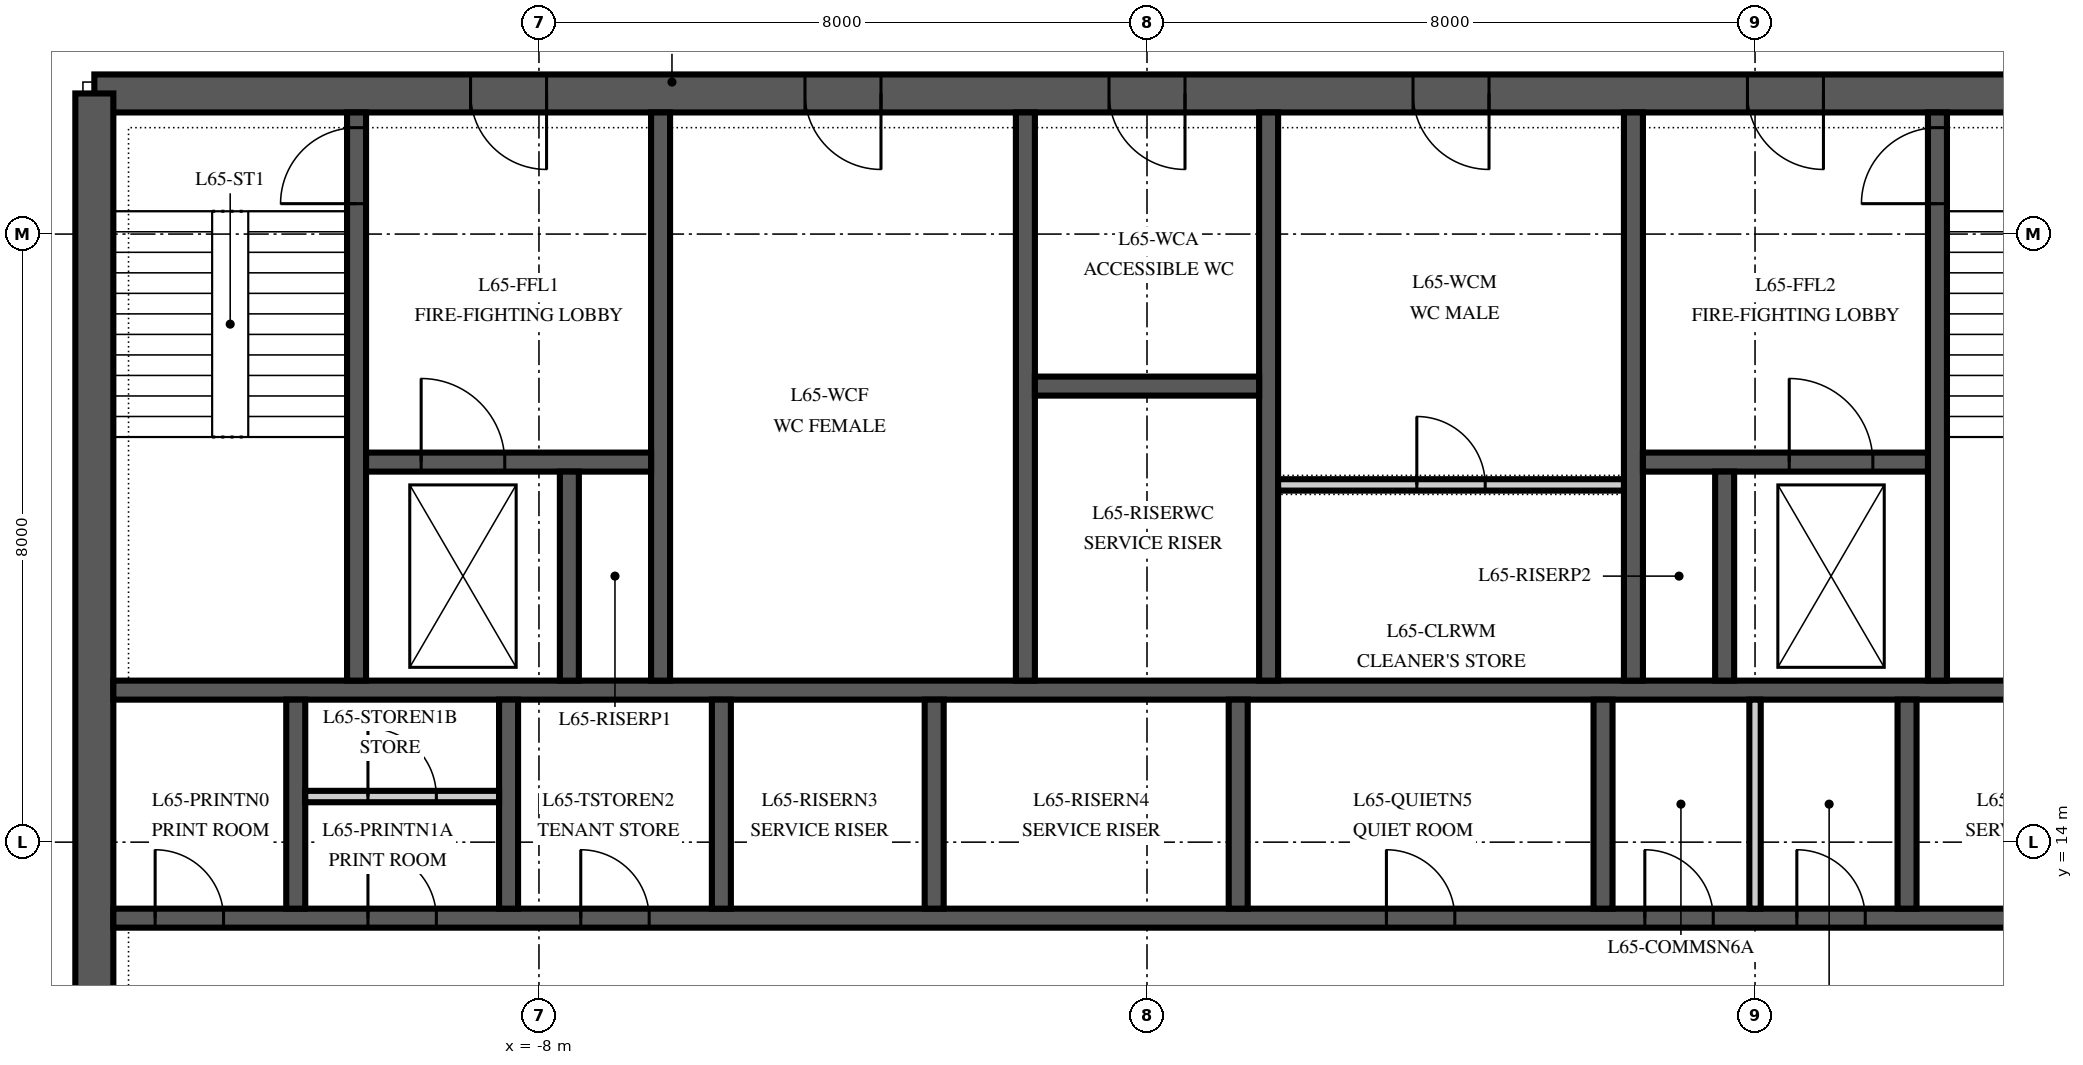
"""IFC4 building model, lengths in metres.
Left out: names, types, materials, properties, quantities, classifications, styles, units other than length and angle.
Written with IfcOpenShell. Run it as: python <this file> out.ifc"""

import sys

from ifc_helpers import new_model, si_unit, direction, frame, frame_2d, origin, place, context, subcontext, project, spatial, polyline, rectangle, outline, extrude, element, fill, save


model = new_model("IFC4")
c1 = context("Model", 3, precision=1e-05, world=origin(), true_north=direction((0.0, 1.0)))
c2 = subcontext(c1, "Body", "Model", "MODEL_VIEW")
j1 = project(units=[si_unit("LENGTHUNIT", "METRE"), si_unit("PLANEANGLEUNIT", "RADIAN")], contexts=[c1])
p1 = place(None, origin())
s1 = spatial("IfcSite", under=j1, at=p1, CompositionType="ELEMENT")
p2 = place(p1, origin())
s2 = spatial("IfcBuilding", under=s1, at=p2, CompositionType="ELEMENT")
p3 = place(p2, frame((0.0, 0.0, 280.0)))
s3 = spatial("IfcBuildingStorey", under=s2, at=p3, CompositionType="ELEMENT", Elevation=280.0)
p4 = place(p3, frame((13.85, 23.85, 0.0), z_axis=(0.0, 0.0, 1.0), x_axis=(-1.0, 0.0, 0.0)))
e1 = element("IfcWall", 1, at=p4, inside=s3, PredefinedType="SHEAR", context=c2, shape_type="SweptSolid", body=[
    extrude(rectangle(XDim=27.7, YDim=0.5, at=frame_2d((13.85, 0.0))), origin(), (0.0, 0.0, 1.0), 4.0),
])
p5 = place(p4, frame((21.75, 0.0, 0.0)))
e2 = element("IfcOpeningElement", 2, at=p5, cuts=e1, PredefinedType="OPENING", context=c2, shape_type="SweptSolid", body=[
    extrude(rectangle(XDim=1.0, YDim=2.1, at=frame_2d((0.5, 1.05))), frame((0.0, 0.265, 0.0), z_axis=(0.0, -1.0, 0.0), x_axis=(1.0, 0.0, 0.0)), (0.0, 0.0, 1.0), 0.53),
])
p6 = place(p4, frame((4.95, 0.0, 0.0)))
e3 = element("IfcOpeningElement", 3, at=p6, cuts=e1, PredefinedType="OPENING", context=c2, shape_type="SweptSolid", body=[
    extrude(rectangle(XDim=1.0, YDim=2.1, at=frame_2d((0.5, 1.05))), frame((0.0, 0.265, 0.0), z_axis=(0.0, -1.0, 0.0), x_axis=(1.0, 0.0, 0.0)), (0.0, 0.0, 1.0), 0.53),
])
p7 = place(p4, frame((17.35, 0.0, 0.0)))
e4 = element("IfcOpeningElement", 4, at=p7, cuts=e1, PredefinedType="OPENING", context=c2, shape_type="SweptSolid", body=[
    extrude(rectangle(XDim=1.0, YDim=2.1, at=frame_2d((0.5, 1.05))), frame((0.0, 0.265, 0.0), z_axis=(0.0, -1.0, 0.0), x_axis=(1.0, 0.0, 0.0)), (0.0, 0.0, 1.0), 0.53),
])
p8 = place(p4, frame((13.35, 0.0, 0.0)))
e5 = element("IfcOpeningElement", 5, at=p8, cuts=e1, PredefinedType="OPENING", context=c2, shape_type="SweptSolid", body=[
    extrude(rectangle(XDim=1.0, YDim=2.1, at=frame_2d((0.5, 1.05))), frame((0.0, 0.265, 0.0), z_axis=(0.0, -1.0, 0.0), x_axis=(1.0, 0.0, 0.0)), (0.0, 0.0, 1.0), 0.53),
])
p9 = place(p4, frame((9.35, 0.0, 0.0)))
e6 = element("IfcOpeningElement", 6, at=p9, cuts=e1, PredefinedType="OPENING", context=c2, shape_type="SweptSolid", body=[
    extrude(rectangle(XDim=1.0, YDim=2.1, at=frame_2d((0.5, 1.05))), frame((0.0, 0.265, 0.0), z_axis=(0.0, -1.0, 0.0), x_axis=(1.0, 0.0, 0.0)), (0.0, 0.0, 1.0), 0.53),
])
p10 = place(p3, frame((-13.85, 23.85, 0.0), z_axis=(0.0, 0.0, 1.0), x_axis=(0.0, -1.0, 0.0)))
e7 = element("IfcWall", 7, at=p10, inside=s3, PredefinedType="SHEAR", context=c2, shape_type="SweptSolid", body=[
    extrude(outline(polyline([(0.0, -0.25), (17.7, -0.25), (17.7, 0.0), (17.45, 0.0), (17.45, 0.25), (0.25, 0.25), (0.25, 0.0), (0.0, 0.0), (0.0, -0.25)])), origin(), (0.0, 0.0, 1.0), 4.0),
])
p11 = place(p10, frame((11.75, 0.0, 0.0)))
e8 = element("IfcOpeningElement", 8, at=p11, cuts=e7, PredefinedType="OPENING", context=c2, shape_type="SweptSolid", body=[
    extrude(rectangle(XDim=1.8, YDim=2.4, at=frame_2d((0.9, 1.2))), frame((0.0, 0.265, 0.0), z_axis=(0.0, -1.0, 0.0), x_axis=(1.0, 0.0, 0.0)), (0.0, 0.0, 1.0), 0.53),
])
p12 = place(p3, frame((-13.6, 13.0, 0.0), z_axis=(0.0, 0.0, 1.0), x_axis=(1.0, 0.0, 0.0)))
e9 = element("IfcWall", 9, at=p12, inside=s3, PredefinedType="SHEAR", context=c2, shape_type="SweptSolid", body=[
    extrude(rectangle(XDim=27.2, YDim=0.25, at=frame_2d((13.6, 0.0))), origin(), (0.0, 0.0, 1.0), 4.0),
])
p13 = place(p12, frame((16.75, 0.0, 0.0)))
e10 = element("IfcOpeningElement", 10, at=p13, cuts=e9, PredefinedType="OPENING", context=c2, shape_type="SweptSolid", body=[
    extrude(rectangle(XDim=0.9, YDim=2.1, at=frame_2d((0.45, 1.05))), frame((0.0, 0.14, 0.0), z_axis=(0.0, -1.0, 0.0), x_axis=(1.0, 0.0, 0.0)), (0.0, 0.0, 1.0), 0.28),
])
p14 = place(p12, frame((20.15, 0.0, 0.0)))
e11 = element("IfcOpeningElement", 11, at=p14, cuts=e9, PredefinedType="OPENING", context=c2, shape_type="SweptSolid", body=[
    extrude(rectangle(XDim=0.9, YDim=2.1, at=frame_2d((0.45, 1.05))), frame((0.0, 0.14, 0.0), z_axis=(0.0, -1.0, 0.0), x_axis=(1.0, 0.0, 0.0)), (0.0, 0.0, 1.0), 0.28),
])
p15 = place(p12, frame((22.15, 0.0, 0.0)))
e12 = element("IfcOpeningElement", 12, at=p15, cuts=e9, PredefinedType="OPENING", context=c2, shape_type="SweptSolid", body=[
    extrude(rectangle(XDim=0.9, YDim=2.1, at=frame_2d((0.45, 1.05))), frame((0.0, 0.14, 0.0), z_axis=(0.0, -1.0, 0.0), x_axis=(1.0, 0.0, 0.0)), (0.0, 0.0, 1.0), 0.28),
])
p16 = place(p12, frame((0.55, 0.0, 0.0)))
e13 = element("IfcOpeningElement", 13, at=p16, cuts=e9, PredefinedType="OPENING", context=c2, shape_type="SweptSolid", body=[
    extrude(rectangle(XDim=0.9, YDim=2.1, at=frame_2d((0.45, 1.05))), frame((0.0, 0.14, 0.0), z_axis=(0.0, -1.0, 0.0), x_axis=(1.0, 0.0, 0.0)), (0.0, 0.0, 1.0), 0.28),
])
p17 = place(p12, frame((3.35, 0.0, 0.0)))
e14 = element("IfcOpeningElement", 14, at=p17, cuts=e9, PredefinedType="OPENING", context=c2, shape_type="SweptSolid", body=[
    extrude(rectangle(XDim=0.9, YDim=2.1, at=frame_2d((0.45, 1.05))), frame((0.0, 0.14, 0.0), z_axis=(0.0, -1.0, 0.0), x_axis=(1.0, 0.0, 0.0)), (0.0, 0.0, 1.0), 0.28),
])
p18 = place(p12, frame((6.15, 0.0, 0.0)))
e15 = element("IfcOpeningElement", 15, at=p18, cuts=e9, PredefinedType="OPENING", context=c2, shape_type="SweptSolid", body=[
    extrude(rectangle(XDim=0.9, YDim=2.1, at=frame_2d((0.45, 1.05))), frame((0.0, 0.14, 0.0), z_axis=(0.0, -1.0, 0.0), x_axis=(1.0, 0.0, 0.0)), (0.0, 0.0, 1.0), 0.28),
])
p19 = place(p3, frame((-13.6, 16.0, 0.0), z_axis=(0.0, 0.0, 1.0), x_axis=(1.0, 0.0, 0.0)))
e16 = element("IfcWall", 16, at=p19, inside=s3, PredefinedType="SHEAR", context=c2, shape_type="SweptSolid", body=[
    extrude(rectangle(XDim=27.2, YDim=0.25, at=frame_2d((13.6, 0.0))), origin(), (0.0, 0.0, 1.0), 4.0),
])
for number, where, z_axis, x_axis in (
    (17, (-11.2, 13.125, 0.0), (0.0, 0.0, 1.0), (0.0, 1.0, 0.0)),
    (18, (-8.4, 13.125, 0.0), (0.0, 0.0, 1.0), (0.0, 1.0, 0.0)),
    (19, (-5.6, 13.125, 0.0), (0.0, 0.0, 1.0), (0.0, 1.0, 0.0)),
    (20, (-2.8, 13.125, 0.0), (0.0, 0.0, 1.0), (0.0, 1.0, 0.0)),
    (21, (1.2, 13.125, 0.0), (0.0, 0.0, 1.0), (0.0, 1.0, 0.0)),
    (22, (6.0, 13.125, 0.0), (0.0, 0.0, 1.0), (0.0, 1.0, 0.0)),
    (23, (10.0, 13.125, 0.0), (0.0, 0.0, 1.0), (0.0, 1.0, 0.0)),
):
    element("IfcWall", number, at=place(p3, frame(where, z_axis=z_axis, x_axis=x_axis)), inside=s3, PredefinedType="SHEAR", context=c2, shape_type="SweptSolid", body=[
        extrude(rectangle(XDim=2.75, YDim=0.25, at=frame_2d((1.375, 0.0))), origin(), (0.0, 0.0, 1.0), 4.0),
    ])
p20 = place(p3, frame((-10.4, 16.125, 0.0), z_axis=(0.0, 0.0, 1.0), x_axis=(0.0, 1.0, 0.0)))
e24 = element("IfcWall", 24, at=p20, inside=s3, PredefinedType="SHEAR", context=c2, shape_type="SweptSolid", body=[
    extrude(rectangle(XDim=7.475, YDim=0.25, at=frame_2d((3.738, 0.0))), origin(), (0.0, 0.0, 1.0), 4.0),
])
p21 = place(p20, frame((6.275, 0.0, 0.0)))
e25 = element("IfcOpeningElement", 25, at=p21, cuts=e24, PredefinedType="OPENING", context=c2, shape_type="SweptSolid", body=[
    extrude(rectangle(XDim=1.0, YDim=2.1, at=frame_2d((0.5, 1.05))), frame((0.0, 0.14, 0.0), z_axis=(0.0, -1.0, 0.0), x_axis=(1.0, 0.0, 0.0)), (0.0, 0.0, 1.0), 0.28),
])
for number, where, z_axis, x_axis in (
    (26, (-6.4, 16.125, 0.0), (0.0, 0.0, 1.0), (0.0, 1.0, 0.0)),
    (27, (-1.6, 16.125, 0.0), (0.0, 0.0, 1.0), (0.0, 1.0, 0.0)),
    (28, (1.6, 16.125, 0.0), (0.0, 0.0, 1.0), (0.0, 1.0, 0.0)),
    (29, (6.4, 16.125, 0.0), (0.0, 0.0, 1.0), (0.0, 1.0, 0.0)),
):
    element("IfcWall", number, at=place(p3, frame(where, z_axis=z_axis, x_axis=x_axis)), inside=s3, PredefinedType="SHEAR", context=c2, shape_type="SweptSolid", body=[
        extrude(rectangle(XDim=7.475, YDim=0.25, at=frame_2d((3.738, 0.0))), origin(), (0.0, 0.0, 1.0), 4.0),
    ])
p22 = place(p3, frame((10.4, 16.125, 0.0), z_axis=(0.0, 0.0, 1.0), x_axis=(0.0, 1.0, 0.0)))
e30 = element("IfcWall", 30, at=p22, inside=s3, PredefinedType="SHEAR", context=c2, shape_type="SweptSolid", body=[
    extrude(rectangle(XDim=7.475, YDim=0.25, at=frame_2d((3.738, 0.0))), origin(), (0.0, 0.0, 1.0), 4.0),
])
p23 = place(p22, frame((6.275, 0.0, 0.0)))
e31 = element("IfcOpeningElement", 31, at=p23, cuts=e30, PredefinedType="OPENING", context=c2, shape_type="SweptSolid", body=[
    extrude(rectangle(XDim=1.0, YDim=2.1, at=frame_2d((0.5, 1.05))), frame((0.0, 0.14, 0.0), z_axis=(0.0, -1.0, 0.0), x_axis=(1.0, 0.0, 0.0)), (0.0, 0.0, 1.0), 0.28),
])
p24 = place(p3, frame((-10.275, 19.0, 0.0), z_axis=(0.0, 0.0, 1.0), x_axis=(1.0, 0.0, 0.0)))
e32 = element("IfcWall", 32, at=p24, inside=s3, PredefinedType="SHEAR", context=c2, shape_type="SweptSolid", body=[
    extrude(rectangle(XDim=3.75, YDim=0.25, at=frame_2d((1.875, 0.0))), origin(), (0.0, 0.0, 1.0), 4.0),
])
p25 = place(p24, frame((0.725, 0.0, 0.0)))
e33 = element("IfcOpeningElement", 33, at=p25, cuts=e32, PredefinedType="OPENING", context=c2, shape_type="SweptSolid", body=[
    extrude(rectangle(XDim=1.1, YDim=2.1, at=frame_2d((0.55, 1.05))), frame((0.0, 0.14, 0.0), z_axis=(0.0, -1.0, 0.0), x_axis=(1.0, 0.0, 0.0)), (0.0, 0.0, 1.0), 0.28),
])
p26 = place(p3, frame((6.525, 19.0, 0.0), z_axis=(0.0, 0.0, 1.0), x_axis=(1.0, 0.0, 0.0)))
e34 = element("IfcWall", 34, at=p26, inside=s3, PredefinedType="SHEAR", context=c2, shape_type="SweptSolid", body=[
    extrude(rectangle(XDim=3.75, YDim=0.25, at=frame_2d((1.875, 0.0))), origin(), (0.0, 0.0, 1.0), 4.0),
])
p27 = place(p26, frame((1.925, 0.0, 0.0)))
e35 = element("IfcOpeningElement", 35, at=p27, cuts=e34, PredefinedType="OPENING", context=c2, shape_type="SweptSolid", body=[
    extrude(rectangle(XDim=1.1, YDim=2.1, at=frame_2d((0.55, 1.05))), frame((0.0, 0.14, 0.0), z_axis=(0.0, -1.0, 0.0), x_axis=(1.0, 0.0, 0.0)), (0.0, 0.0, 1.0), 0.28),
])
for number, where, z_axis, x_axis in (
    (36, (-7.6, 16.125, 0.0), (0.0, 0.0, 1.0), (0.0, 1.0, 0.0)),
    (37, (7.6, 16.125, 0.0), (0.0, 0.0, 1.0), (0.0, 1.0, 0.0)),
):
    element("IfcWall", number, at=place(p3, frame(where, z_axis=z_axis, x_axis=x_axis)), inside=s3, PredefinedType="SHEAR", context=c2, shape_type="SweptSolid", body=[
        extrude(rectangle(XDim=2.75, YDim=0.25, at=frame_2d((1.375, 0.0))), origin(), (0.0, 0.0, 1.0), 4.0),
    ])
p28 = place(p3, frame((-1.475, 20.0, 0.0), z_axis=(0.0, 0.0, 1.0), x_axis=(1.0, 0.0, 0.0)))
e38 = element("IfcWall", 38, at=p28, inside=s3, PredefinedType="SHEAR", context=c2, shape_type="SweptSolid", body=[
    extrude(rectangle(XDim=2.95, YDim=0.25, at=frame_2d((1.475, 0.0))), origin(), (0.0, 0.0, 1.0), 4.0),
])
p29 = place(p3, frame((1.725, 18.7, 0.0), z_axis=(0.0, 0.0, 1.0), x_axis=(1.0, 0.0, 0.0)))
e39 = element("IfcWall", 39, at=p29, inside=s3, PredefinedType="PARTITIONING", context=c2, shape_type="SweptSolid", body=[
    extrude(rectangle(XDim=4.55, YDim=0.15, at=frame_2d((2.275, 0.0))), origin(), (0.0, 0.0, 1.0), 3.85),
])
p30 = place(p29, frame((1.825, 0.0, 0.0)))
e40 = element("IfcOpeningElement", 40, at=p30, cuts=e39, PredefinedType="OPENING", context=c2, shape_type="SweptSolid", body=[
    extrude(rectangle(XDim=0.9, YDim=2.1, at=frame_2d((0.45, 1.05))), frame((0.0, 0.09, 0.0), z_axis=(0.0, -1.0, 0.0), x_axis=(1.0, 0.0, 0.0)), (0.0, 0.0, 1.0), 0.18),
])
p31 = place(p3, frame((8.0, 13.125, 0.0), z_axis=(0.0, 0.0, 1.0), x_axis=(0.0, 1.0, 0.0)))
e41 = element("IfcWall", 41, at=p31, inside=s3, PredefinedType="PARTITIONING", context=c2, shape_type="SweptSolid", body=[
    extrude(rectangle(XDim=2.75, YDim=0.15, at=frame_2d((1.375, 0.0))), origin(), (0.0, 0.0, 1.0), 3.85),
])
p32 = place(p3, frame((-11.075, 14.6, 0.0), z_axis=(0.0, 0.0, 1.0), x_axis=(1.0, 0.0, 0.0)))
e42 = element("IfcWall", 42, at=p32, inside=s3, PredefinedType="PARTITIONING", context=c2, shape_type="SweptSolid", body=[
    extrude(rectangle(XDim=2.55, YDim=0.15, at=frame_2d((1.275, 0.0))), origin(), (0.0, 0.0, 1.0), 3.85),
])
p33 = place(p32, frame((0.825, 0.0, 0.0)))
e43 = element("IfcOpeningElement", 43, at=p33, cuts=e42, PredefinedType="OPENING", context=c2, shape_type="SweptSolid", body=[
    extrude(rectangle(XDim=0.9, YDim=2.1, at=frame_2d((0.45, 1.05))), frame((0.0, 0.09, 0.0), z_axis=(0.0, -1.0, 0.0), x_axis=(1.0, 0.0, 0.0)), (0.0, 0.0, 1.0), 0.18),
])
p34 = place(p5, origin())
e44 = element("IfcDoor", 44, at=p34, inside=s3, OperationType="SINGLE_SWING_RIGHT", PredefinedType="DOOR", context=c2, shape_type="SweptSolid", body=[
    extrude(rectangle(XDim=1.0, YDim=2.1, at=frame_2d((0.5, 1.05))), frame((0.0, 0.25, 0.0), z_axis=(0.0, -1.0, 0.0), x_axis=(1.0, 0.0, 0.0)), (0.0, 0.0, 1.0), 0.5),
])
fill(e2, e44)
p35 = place(p6, origin())
e45 = element("IfcDoor", 45, at=p35, inside=s3, OperationType="SINGLE_SWING_RIGHT", PredefinedType="DOOR", context=c2, shape_type="SweptSolid", body=[
    extrude(rectangle(XDim=1.0, YDim=2.1, at=frame_2d((0.5, 1.05))), frame((0.0, 0.25, 0.0), z_axis=(0.0, -1.0, 0.0), x_axis=(1.0, 0.0, 0.0)), (0.0, 0.0, 1.0), 0.5),
])
fill(e3, e45)
p36 = place(p7, origin())
e46 = element("IfcDoor", 46, at=p36, inside=s3, OperationType="SINGLE_SWING_LEFT", PredefinedType="DOOR", context=c2, shape_type="SweptSolid", body=[
    extrude(rectangle(XDim=1.0, YDim=2.1, at=frame_2d((0.5, 1.05))), frame((0.0, 0.25, 0.0), z_axis=(0.0, -1.0, 0.0), x_axis=(1.0, 0.0, 0.0)), (0.0, 0.0, 1.0), 0.5),
])
fill(e4, e46)
p37 = place(p8, origin())
e47 = element("IfcDoor", 47, at=p37, inside=s3, OperationType="SINGLE_SWING_LEFT", PredefinedType="DOOR", context=c2, shape_type="SweptSolid", body=[
    extrude(rectangle(XDim=1.0, YDim=2.1, at=frame_2d((0.5, 1.05))), frame((0.0, 0.25, 0.0), z_axis=(0.0, -1.0, 0.0), x_axis=(1.0, 0.0, 0.0)), (0.0, 0.0, 1.0), 0.5),
])
fill(e5, e47)
p38 = place(p9, origin())
e48 = element("IfcDoor", 48, at=p38, inside=s3, OperationType="SINGLE_SWING_LEFT", PredefinedType="DOOR", context=c2, shape_type="SweptSolid", body=[
    extrude(rectangle(XDim=1.0, YDim=2.1, at=frame_2d((0.5, 1.05))), frame((0.0, 0.25, 0.0), z_axis=(0.0, -1.0, 0.0), x_axis=(1.0, 0.0, 0.0)), (0.0, 0.0, 1.0), 0.5),
])
fill(e6, e48)
p39 = place(p21, origin())
e49 = element("IfcDoor", 49, at=p39, inside=s3, OperationType="SINGLE_SWING_LEFT", PredefinedType="DOOR", context=c2, shape_type="SweptSolid", body=[
    extrude(rectangle(XDim=1.0, YDim=2.1, at=frame_2d((0.5, 1.05))), frame((0.0, 0.125, 0.0), z_axis=(0.0, -1.0, 0.0), x_axis=(1.0, 0.0, 0.0)), (0.0, 0.0, 1.0), 0.25),
])
fill(e25, e49)
p40 = place(p23, origin())
e50 = element("IfcDoor", 50, at=p40, inside=s3, OperationType="SINGLE_SWING_LEFT", PredefinedType="DOOR", context=c2, shape_type="SweptSolid", body=[
    extrude(rectangle(XDim=1.0, YDim=2.1, at=frame_2d((0.5, 1.05))), frame((0.0, 0.125, 0.0), z_axis=(0.0, -1.0, 0.0), x_axis=(1.0, 0.0, 0.0)), (0.0, 0.0, 1.0), 0.25),
])
fill(e31, e50)
p41 = place(p27, origin())
e51 = element("IfcDoor", 51, at=p41, inside=s3, OperationType="SLIDING_TO_RIGHT", PredefinedType="DOOR", context=c2, shape_type="SweptSolid", body=[
    extrude(rectangle(XDim=1.1, YDim=2.1, at=frame_2d((0.55, 1.05))), frame((0.0, 0.125, 0.0), z_axis=(0.0, -1.0, 0.0), x_axis=(1.0, 0.0, 0.0)), (0.0, 0.0, 1.0), 0.25),
])
fill(e35, e51)
p42 = place(p25, origin())
e52 = element("IfcDoor", 52, at=p42, inside=s3, OperationType="SLIDING_TO_RIGHT", PredefinedType="DOOR", context=c2, shape_type="SweptSolid", body=[
    extrude(rectangle(XDim=1.1, YDim=2.1, at=frame_2d((0.55, 1.05))), frame((0.0, 0.125, 0.0), z_axis=(0.0, -1.0, 0.0), x_axis=(1.0, 0.0, 0.0)), (0.0, 0.0, 1.0), 0.25),
])
fill(e33, e52)
p43 = place(p13, origin())
e53 = element("IfcDoor", 53, at=p43, inside=s3, OperationType="SINGLE_SWING_LEFT", PredefinedType="DOOR", context=c2, shape_type="SweptSolid", body=[
    extrude(rectangle(XDim=0.9, YDim=2.1, at=frame_2d((0.45, 1.05))), frame((0.0, 0.125, 0.0), z_axis=(0.0, -1.0, 0.0), x_axis=(1.0, 0.0, 0.0)), (0.0, 0.0, 1.0), 0.25),
])
fill(e10, e53)
p44 = place(p14, origin())
e54 = element("IfcDoor", 54, at=p44, inside=s3, OperationType="SINGLE_SWING_LEFT", PredefinedType="DOOR", context=c2, shape_type="SweptSolid", body=[
    extrude(rectangle(XDim=0.9, YDim=2.1, at=frame_2d((0.45, 1.05))), frame((0.0, 0.125, 0.0), z_axis=(0.0, -1.0, 0.0), x_axis=(1.0, 0.0, 0.0)), (0.0, 0.0, 1.0), 0.25),
])
fill(e11, e54)
p45 = place(p15, origin())
e55 = element("IfcDoor", 55, at=p45, inside=s3, OperationType="SINGLE_SWING_LEFT", PredefinedType="DOOR", context=c2, shape_type="SweptSolid", body=[
    extrude(rectangle(XDim=0.9, YDim=2.1, at=frame_2d((0.45, 1.05))), frame((0.0, 0.125, 0.0), z_axis=(0.0, -1.0, 0.0), x_axis=(1.0, 0.0, 0.0)), (0.0, 0.0, 1.0), 0.25),
])
fill(e12, e55)
p46 = place(p16, origin())
e56 = element("IfcDoor", 56, at=p46, inside=s3, OperationType="SINGLE_SWING_LEFT", PredefinedType="DOOR", context=c2, shape_type="SweptSolid", body=[
    extrude(rectangle(XDim=0.9, YDim=2.1, at=frame_2d((0.45, 1.05))), frame((0.0, 0.125, 0.0), z_axis=(0.0, -1.0, 0.0), x_axis=(1.0, 0.0, 0.0)), (0.0, 0.0, 1.0), 0.25),
])
fill(e13, e56)
p47 = place(p17, origin())
e57 = element("IfcDoor", 57, at=p47, inside=s3, OperationType="SINGLE_SWING_LEFT", PredefinedType="DOOR", context=c2, shape_type="SweptSolid", body=[
    extrude(rectangle(XDim=0.9, YDim=2.1, at=frame_2d((0.45, 1.05))), frame((0.0, 0.125, 0.0), z_axis=(0.0, -1.0, 0.0), x_axis=(1.0, 0.0, 0.0)), (0.0, 0.0, 1.0), 0.25),
])
fill(e14, e57)
p48 = place(p33, origin())
e58 = element("IfcDoor", 58, at=p48, inside=s3, OperationType="SINGLE_SWING_LEFT", PredefinedType="DOOR", context=c2, shape_type="SweptSolid", body=[
    extrude(rectangle(XDim=0.9, YDim=2.1, at=frame_2d((0.45, 1.05))), frame((0.0, 0.075, 0.0), z_axis=(0.0, -1.0, 0.0), x_axis=(1.0, 0.0, 0.0)), (0.0, 0.0, 1.0), 0.149),
])
fill(e43, e58)
p49 = place(p18, origin())
e59 = element("IfcDoor", 59, at=p49, inside=s3, OperationType="SINGLE_SWING_LEFT", PredefinedType="DOOR", context=c2, shape_type="SweptSolid", body=[
    extrude(rectangle(XDim=0.9, YDim=2.1, at=frame_2d((0.45, 1.05))), frame((0.0, 0.125, 0.0), z_axis=(0.0, -1.0, 0.0), x_axis=(1.0, 0.0, 0.0)), (0.0, 0.0, 1.0), 0.25),
])
fill(e15, e59)
p50 = place(p30, origin())
e60 = element("IfcDoor", 60, at=p50, inside=s3, OperationType="SINGLE_SWING_LEFT", PredefinedType="DOOR", context=c2, shape_type="SweptSolid", body=[
    extrude(rectangle(XDim=0.9, YDim=2.1, at=frame_2d((0.45, 1.05))), frame((0.0, 0.075, 0.0), z_axis=(0.0, -1.0, 0.0), x_axis=(1.0, 0.0, 0.0)), (0.0, 0.0, 1.0), 0.149),
])
fill(e40, e60)
save(model, sys.argv[1])
